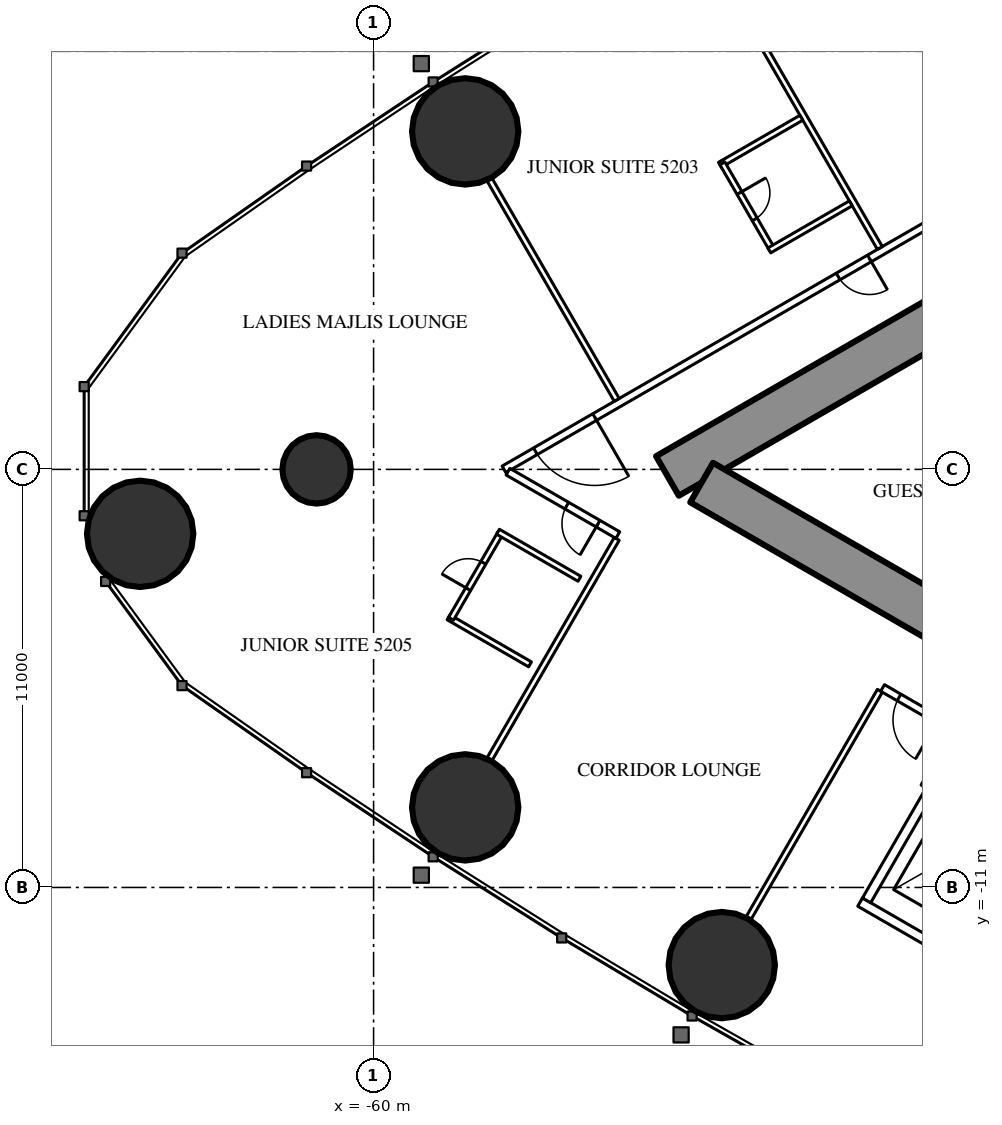
"""IFC4 building model, lengths in metres.
Left out: names, types, materials, properties, quantities, classifications, styles, units other than length and angle.
Written with IfcOpenShell. Run it as: python <this file> out.ifc"""

import sys

from ifc_helpers import new_model, si_unit, direction, frame, frame_2d, origin, origin_2d, place, context, subcontext, project, spatial, rectangle, circle, extrude, element, fill, save


model = new_model("IFC4")
c1 = context("Model", 3, precision=1e-05, world=origin(), true_north=direction((0.0, 1.0)))
c2 = subcontext(c1, "Body", "Model", "MODEL_VIEW")
j1 = project(units=[si_unit("LENGTHUNIT", "METRE"), si_unit("PLANEANGLEUNIT", "RADIAN")], contexts=[c1])
p1 = place(None, origin())
s1 = spatial("IfcSite", under=j1, at=p1, CompositionType="ELEMENT")
p2 = place(p1, origin())
s2 = spatial("IfcBuilding", under=s1, at=p2, CompositionType="ELEMENT")
p3 = place(p2, frame((0.0, 0.0, 194.8)))
s3 = spatial("IfcBuildingStorey", under=s2, at=p3, CompositionType="ELEMENT", Elevation=194.8)
for number, where, z_axis, x_axis in (
    (1, (-66.143, -1.695, 0.0), (0.0, 0.0, 1.0), (1.0, 0.0, 0.0)),
    (2, (-57.59, -8.893, 0.0), (0.0, 0.0, 1.0), (1.0, 0.0, 0.0)),
    (3, (-50.839, -13.043, 0.0), (0.0, 0.0, 1.0), (1.0, 0.0, 0.0)),
    (4, (-57.59, 8.893, 0.0), (0.0, 0.0, 1.0), (1.0, 0.0, 0.0)),
):
    element("IfcColumn", number, at=place(p3, frame(where, z_axis=z_axis, x_axis=x_axis)), inside=s3, PredefinedType="COLUMN", context=c2, shape_type="SweptSolid", body=[
        extrude(circle(Radius=1.4, at=origin_2d()), origin(), (0.0, 0.0, 1.0), 3.5),
    ])
p4 = place(p3, frame((-61.5, 0.0, 0.0), z_axis=(0.0, 0.0, 1.0), x_axis=(1.0, 0.0, 0.0)))
e5 = element("IfcColumn", 5, at=p4, inside=s3, PredefinedType="COLUMN", context=c2, shape_type="SweptSolid", body=[
    extrude(circle(Radius=0.9, at=origin_2d()), origin(), (0.0, 0.0, 1.0), 3.5),
])
p5 = place(p3, frame((-27.2, 14.3, 0.0), z_axis=(0.0, 0.0, 1.0), x_axis=(-0.866026593062, -0.499997940104, 0.0)))
e6 = element("IfcWall", 6, at=p5, inside=s3, PredefinedType="SHEAR", context=c2, shape_type="SweptSolid", body=[
    extrude(rectangle(XDim=28.946, YDim=1.2, at=frame_2d((14.473, 0.0))), origin(), (0.0, 0.0, 1.0), 3.5),
])
p6 = place(p5, frame((4.6, 0.0, 0.0)))
e7 = element("IfcOpeningElement", 7, at=p6, cuts=e6, PredefinedType="OPENING", context=c2, shape_type="SweptSolid", body=[
    extrude(rectangle(XDim=1.0, YDim=2.2, at=frame_2d((0.5, 1.1))), frame((0.0, 0.61, 0.0), z_axis=(0.0, -1.0, 0.0), x_axis=(1.0, 0.0, 0.0)), (0.0, 0.0, 1.0), 1.22),
])
p7 = place(p5, frame((13.395, 0.0, 0.0)))
e8 = element("IfcOpeningElement", 8, at=p7, cuts=e6, PredefinedType="OPENING", context=c2, shape_type="SweptSolid", body=[
    extrude(rectangle(XDim=1.8, YDim=2.2, at=frame_2d((0.9, 1.1))), frame((0.0, 0.61, 0.0), z_axis=(0.0, -1.0, 0.0), x_axis=(1.0, 0.0, 0.0)), (0.0, 0.0, 1.0), 1.22),
])
p8 = place(p3, frame((-27.2, -14.3, 0.0), z_axis=(0.0, 0.0, 1.0), x_axis=(-0.866024021859, 0.500002393557, 0.0)))
e9 = element("IfcWall", 9, at=p8, inside=s3, PredefinedType="SHEAR", context=c2, shape_type="SweptSolid", body=[
    extrude(rectangle(XDim=27.907, YDim=1.2, at=frame_2d((13.954, 0.0))), origin(), (0.0, 0.0, 1.0), 3.5),
])
p9 = place(p8, frame((4.6, 0.0, 0.0)))
e10 = element("IfcOpeningElement", 10, at=p9, cuts=e9, PredefinedType="OPENING", context=c2, shape_type="SweptSolid", body=[
    extrude(rectangle(XDim=1.0, YDim=2.2, at=frame_2d((0.5, 1.1))), frame((0.0, 0.61, 0.0), z_axis=(0.0, -1.0, 0.0), x_axis=(1.0, 0.0, 0.0)), (0.0, 0.0, 1.0), 1.22),
])
p10 = place(p8, frame((13.395, 0.0, 0.0)))
e11 = element("IfcOpeningElement", 11, at=p10, cuts=e9, PredefinedType="OPENING", context=c2, shape_type="SweptSolid", body=[
    extrude(rectangle(XDim=1.8, YDim=2.2, at=frame_2d((0.9, 1.1))), frame((0.0, 0.61, 0.0), z_axis=(0.0, -1.0, 0.0), x_axis=(1.0, 0.0, 0.0)), (0.0, 0.0, 1.0), 1.22),
])
p11 = place(p3, frame((-27.86, 16.575, 0.0), z_axis=(0.0, 0.0, 1.0), x_axis=(-0.866025533911, -0.499999774615, 0.0)))
e12 = element("IfcWall", 12, at=p11, inside=s3, PredefinedType="PARTITIONING", context=c2, shape_type="SweptSolid", body=[
    extrude(rectangle(XDim=33.149, YDim=0.2, at=frame_2d((16.575, 0.0))), origin(), (0.0, 0.0, 1.0), 3.25),
])
p12 = place(p11, frame((3.75, 0.0, 0.0)))
e13 = element("IfcOpeningElement", 13, at=p12, cuts=e12, PredefinedType="OPENING", context=c2, shape_type="SweptSolid", body=[
    extrude(rectangle(XDim=1.0, YDim=2.2, at=frame_2d((0.5, 1.1))), frame((0.0, 0.11, 0.0), z_axis=(0.0, -1.0, 0.0), x_axis=(1.0, 0.0, 0.0)), (0.0, 0.0, 1.0), 0.22),
])
p13 = place(p11, frame((16.402, 0.0, 0.0)))
e14 = element("IfcOpeningElement", 14, at=p13, cuts=e12, PredefinedType="OPENING", context=c2, shape_type="SweptSolid", body=[
    extrude(rectangle(XDim=0.95, YDim=2.2, at=frame_2d((0.475, 1.1))), frame((0.0, 0.11, 0.0), z_axis=(0.0, -1.0, 0.0), x_axis=(1.0, 0.0, 0.0)), (0.0, 0.0, 1.0), 0.22),
])
p14 = place(p11, frame((22.047, 0.0, 0.0)))
e15 = element("IfcOpeningElement", 15, at=p14, cuts=e12, PredefinedType="OPENING", context=c2, shape_type="SweptSolid", body=[
    extrude(rectangle(XDim=0.95, YDim=2.2, at=frame_2d((0.475, 1.1))), frame((0.0, 0.11, 0.0), z_axis=(0.0, -1.0, 0.0), x_axis=(1.0, 0.0, 0.0)), (0.0, 0.0, 1.0), 0.22),
])
p15 = place(p11, frame((30.396, 0.0, 0.0)))
e16 = element("IfcOpeningElement", 16, at=p15, cuts=e12, PredefinedType="OPENING", context=c2, shape_type="SweptSolid", body=[
    extrude(rectangle(XDim=1.8, YDim=2.2, at=frame_2d((0.9, 1.1))), frame((0.0, 0.11, 0.0), z_axis=(0.0, -1.0, 0.0), x_axis=(1.0, 0.0, 0.0)), (0.0, 0.0, 1.0), 0.22),
])
p16 = place(p3, frame((-46.679, 5.825, 0.0), z_axis=(0.0, 0.0, 1.0), x_axis=(-0.500006839597, 0.866021454905, 0.0)))
e17 = element("IfcWall", 17, at=p16, inside=s3, PredefinedType="PARTITIONING", context=c2, shape_type="SweptSolid", body=[
    extrude(rectangle(XDim=6.911, YDim=0.15, at=frame_2d((3.456, 0.0))), origin(), (0.0, 0.0, 1.0), 2.3),
])
p17 = place(p3, frame((-53.602, 1.828, 0.0), z_axis=(0.0, 0.0, 1.0), x_axis=(-0.49999191814, 0.866030069798, 0.0)))
e18 = element("IfcWall", 18, at=p17, inside=s3, PredefinedType="PARTITIONING", context=c2, shape_type="SweptSolid", body=[
    extrude(rectangle(XDim=6.692, YDim=0.15, at=frame_2d((3.346, 0.0))), origin(), (0.0, 0.0, 1.0), 2.3),
])
p18 = place(p3, frame((-46.679, -5.825, 0.0), z_axis=(0.0, 0.0, 1.0), x_axis=(-0.500006839597, -0.866021454905, 0.0)))
e19 = element("IfcWall", 19, at=p18, inside=s3, PredefinedType="PARTITIONING", context=c2, shape_type="SweptSolid", body=[
    extrude(rectangle(XDim=6.911, YDim=0.15, at=frame_2d((3.456, 0.0))), origin(), (0.0, 0.0, 1.0), 2.3),
])
p19 = place(p3, frame((-53.602, -1.828, 0.0), z_axis=(0.0, 0.0, 1.0), x_axis=(-0.49999191814, -0.866030069798, 0.0)))
e20 = element("IfcWall", 20, at=p19, inside=s3, PredefinedType="PARTITIONING", context=c2, shape_type="SweptSolid", body=[
    extrude(rectangle(XDim=6.692, YDim=0.15, at=frame_2d((3.346, 0.0))), origin(), (0.0, 0.0, 1.0), 2.3),
])
p20 = place(p3, frame((-44.652, -6.764, 0.0), z_axis=(0.0, 0.0, 1.0), x_axis=(-0.485424724123, -0.874278466629, 0.0)))
e21 = element("IfcWall", 21, at=p20, inside=s3, PredefinedType="PARTITIONING", context=c2, shape_type="SweptSolid", body=[
    extrude(rectangle(XDim=1.805, YDim=0.15, at=frame_2d((0.903, 0.0))), origin(), (0.0, 0.0, 1.0), 3.25),
])
p21 = place(p3, frame((-44.715, -6.844, 0.0), z_axis=(0.0, 0.0, 1.0), x_axis=(-0.865999496279, 0.500044870432, 0.0)))
e22 = element("IfcWall", 22, at=p21, inside=s3, PredefinedType="PARTITIONING", context=c2, shape_type="SweptSolid", body=[
    extrude(rectangle(XDim=2.185, YDim=0.2, at=frame_2d((1.092, 0.0))), origin(), (0.0, 0.0, 1.0), 3.25),
])
p22 = place(p21, frame((0.5, 0.0, 0.0)))
e23 = element("IfcOpeningElement", 23, at=p22, cuts=e22, PredefinedType="OPENING", context=c2, shape_type="SweptSolid", body=[
    extrude(rectangle(XDim=1.185, YDim=2.2, at=frame_2d((0.593, 1.1))), frame((0.0, 0.11, 0.0), z_axis=(0.0, -1.0, 0.0), x_axis=(1.0, 0.0, 0.0)), (0.0, 0.0, 1.0), 0.22),
])
p23 = place(p3, frame((-53.574, -1.729, 0.0), z_axis=(0.0, 0.0, 1.0), x_axis=(-0.866019930389, 0.500009480079, 0.0)))
e24 = element("IfcWall", 24, at=p23, inside=s3, PredefinedType="PARTITIONING", context=c2, shape_type="SweptSolid", body=[
    extrude(rectangle(XDim=3.338, YDim=0.2, at=frame_2d((1.669, 0.0))), origin(), (0.0, 0.0, 1.0), 3.25),
])
p24 = place(p23, frame((0.6, 0.0, 0.0)))
e25 = element("IfcOpeningElement", 25, at=p24, cuts=e24, PredefinedType="OPENING", context=c2, shape_type="SweptSolid", body=[
    extrude(rectangle(XDim=0.95, YDim=2.2, at=frame_2d((0.475, 1.1))), frame((0.0, 0.11, 0.0), z_axis=(0.0, -1.0, 0.0), x_axis=(1.0, 0.0, 0.0)), (0.0, 0.0, 1.0), 0.22),
])
p25 = place(p3, frame((-48.744, 9.252, 0.0), z_axis=(0.0, 0.0, 1.0), x_axis=(-0.866006523861, -0.500032699561, 0.0)))
e26 = element("IfcWall", 26, at=p25, inside=s3, PredefinedType="PARTITIONING", context=c2, shape_type="SweptSolid", body=[
    extrude(rectangle(XDim=2.475, YDim=0.15, at=frame_2d((1.237, 0.0))), origin(), (0.0, 0.0, 1.0), 3.25),
])
p26 = place(p3, frame((-49.522, 5.8, 0.0), z_axis=(0.0, 0.0, 1.0), x_axis=(-0.500006934395, 0.866021400173, 0.0)))
e27 = element("IfcWall", 27, at=p26, inside=s3, PredefinedType="PARTITIONING", context=c2, shape_type="SweptSolid", body=[
    extrude(rectangle(XDim=2.6, YDim=0.15, at=frame_2d((1.3, 0.0))), origin(), (0.0, 0.0, 1.0), 3.25),
])
p27 = place(p26, frame((0.9, 0.0, 0.0)))
e28 = element("IfcOpeningElement", 28, at=p27, cuts=e27, PredefinedType="OPENING", context=c2, shape_type="SweptSolid", body=[
    extrude(rectangle(XDim=0.8, YDim=2.2, at=frame_2d((0.4, 1.1))), frame((0.0, 0.085, 0.0), z_axis=(0.0, -1.0, 0.0), x_axis=(1.0, 0.0, 0.0)), (0.0, 0.0, 1.0), 0.17),
])
for number, where, z_axis, x_axis in (
    (29, (-47.444, 7.0, 0.0), (0.0, 0.0, 1.0), (-0.866, -0.5, 0.0)),
    (30, (-55.884, -5.13, 0.0), (0.0, 0.0, 1.0), (-0.866, 0.5, 0.0)),
):
    element("IfcWall", number, at=place(p3, frame(where, z_axis=z_axis, x_axis=x_axis)), inside=s3, PredefinedType="PARTITIONING", context=c2, shape_type="SweptSolid", body=[
        extrude(rectangle(XDim=2.475, YDim=0.15, at=frame_2d((1.237, 0.0))), origin(), (0.0, 0.0, 1.0), 3.25),
    ])
p28 = place(p3, frame((-56.662, -1.678, 0.0), z_axis=(0.0, 0.0, 1.0), x_axis=(-0.500006934395, -0.866021400173, 0.0)))
e31 = element("IfcWall", 31, at=p28, inside=s3, PredefinedType="PARTITIONING", context=c2, shape_type="SweptSolid", body=[
    extrude(rectangle(XDim=2.6, YDim=0.15, at=frame_2d((1.3, 0.0))), origin(), (0.0, 0.0, 1.0), 3.25),
])
p29 = place(p28, frame((0.9, 0.0, 0.0)))
e32 = element("IfcOpeningElement", 32, at=p29, cuts=e31, PredefinedType="OPENING", context=c2, shape_type="SweptSolid", body=[
    extrude(rectangle(XDim=0.8, YDim=2.2, at=frame_2d((0.4, 1.1))), frame((0.0, 0.085, 0.0), z_axis=(0.0, -1.0, 0.0), x_axis=(1.0, 0.0, 0.0)), (0.0, 0.0, 1.0), 0.17),
])
p30 = place(p3, frame((-54.583, -2.878, 0.0), z_axis=(0.0, 0.0, 1.0), x_axis=(-0.866006523861, 0.500032699561, 0.0)))
e33 = element("IfcWall", 33, at=p30, inside=s3, PredefinedType="PARTITIONING", context=c2, shape_type="SweptSolid", body=[
    extrude(rectangle(XDim=2.475, YDim=0.15, at=frame_2d((1.237, 0.0))), origin(), (0.0, 0.0, 1.0), 3.25),
])
p31 = place(p3, frame((-41.482, -14.686, 0.0), z_axis=(0.0, 0.0, 1.0), x_axis=(-0.86603344179, 0.499986077507, 0.0)))
e34 = element("IfcWall", 34, at=p31, inside=s3, PredefinedType="PARTITIONING", context=c2, shape_type="SweptSolid", body=[
    extrude(rectangle(XDim=6.6, YDim=0.25, at=frame_2d((3.3, 0.0))), origin(), (0.0, 0.0, 1.0), 3.25),
])
p32 = place(p3, frame((-45.428, -8.568, 0.0), z_axis=(0.0, 0.0, 1.0), x_axis=(-0.499929347863, -0.866066190972, 0.0)))
e35 = element("IfcWall", 35, at=p32, inside=s3, PredefinedType="PARTITIONING", context=c2, shape_type="SweptSolid", body=[
    extrude(rectangle(XDim=3.201, YDim=0.25, at=frame_2d((1.6, 0.0))), origin(), (0.0, 0.0, 1.0), 3.25),
])
p33 = place(p27, origin())
e36 = element("IfcDoor", 36, at=p33, inside=s3, OperationType="SINGLE_SWING_RIGHT", PredefinedType="DOOR", context=c2, shape_type="SweptSolid", body=[
    extrude(rectangle(XDim=0.8, YDim=2.2, at=frame_2d((0.4, 1.1))), frame((0.0, 0.025, 0.0), z_axis=(0.0, -1.0, 0.0), x_axis=(1.0, 0.0, 0.0)), (0.0, 0.0, 1.0), 0.05),
])
fill(e28, e36)
p34 = place(p14, origin())
e37 = element("IfcDoor", 37, at=p34, inside=s3, OperationType="SINGLE_SWING_LEFT", PredefinedType="DOOR", context=c2, shape_type="SweptSolid", body=[
    extrude(rectangle(XDim=0.95, YDim=2.2, at=frame_2d((0.475, 1.1))), frame((0.0, 0.025, 0.0), z_axis=(0.0, -1.0, 0.0), x_axis=(1.0, 0.0, 0.0)), (0.0, 0.0, 1.0), 0.05),
])
fill(e15, e37)
p35 = place(p15, origin())
e38 = element("IfcDoor", 38, at=p35, inside=s3, OperationType="DOUBLE_DOOR_SINGLE_SWING", PredefinedType="DOOR", context=c2, shape_type="SweptSolid", body=[
    extrude(rectangle(XDim=1.8, YDim=2.2, at=frame_2d((0.9, 1.1))), frame((0.0, 0.025, 0.0), z_axis=(0.0, -1.0, 0.0), x_axis=(1.0, 0.0, 0.0)), (0.0, 0.0, 1.0), 0.05),
])
fill(e16, e38)
p36 = place(p29, origin())
e39 = element("IfcDoor", 39, at=p36, inside=s3, OperationType="SINGLE_SWING_RIGHT", PredefinedType="DOOR", context=c2, shape_type="SweptSolid", body=[
    extrude(rectangle(XDim=0.8, YDim=2.2, at=frame_2d((0.4, 1.1))), frame((0.0, 0.025, 0.0), z_axis=(0.0, -1.0, 0.0), x_axis=(1.0, 0.0, 0.0)), (0.0, 0.0, 1.0), 0.05),
])
fill(e32, e39)
p37 = place(p24, origin())
e40 = element("IfcDoor", 40, at=p37, inside=s3, OperationType="SINGLE_SWING_LEFT", PredefinedType="DOOR", context=c2, shape_type="SweptSolid", body=[
    extrude(rectangle(XDim=0.95, YDim=2.2, at=frame_2d((0.475, 1.1))), frame((0.0, 0.025, 0.0), z_axis=(0.0, -1.0, 0.0), x_axis=(1.0, 0.0, 0.0)), (0.0, 0.0, 1.0), 0.05),
])
fill(e25, e40)
p38 = place(p22, origin())
e41 = element("IfcDoor", 41, at=p38, inside=s3, OperationType="SINGLE_SWING_LEFT", PredefinedType="DOOR", context=c2, shape_type="SweptSolid", body=[
    extrude(rectangle(XDim=1.185, YDim=2.2, at=frame_2d((0.593, 1.1))), frame((0.0, 0.025, 0.0), z_axis=(0.0, -1.0, 0.0), x_axis=(1.0, 0.0, 0.0)), (0.0, 0.0, 1.0), 0.05),
])
fill(e23, e41)
save(model, sys.argv[1])
